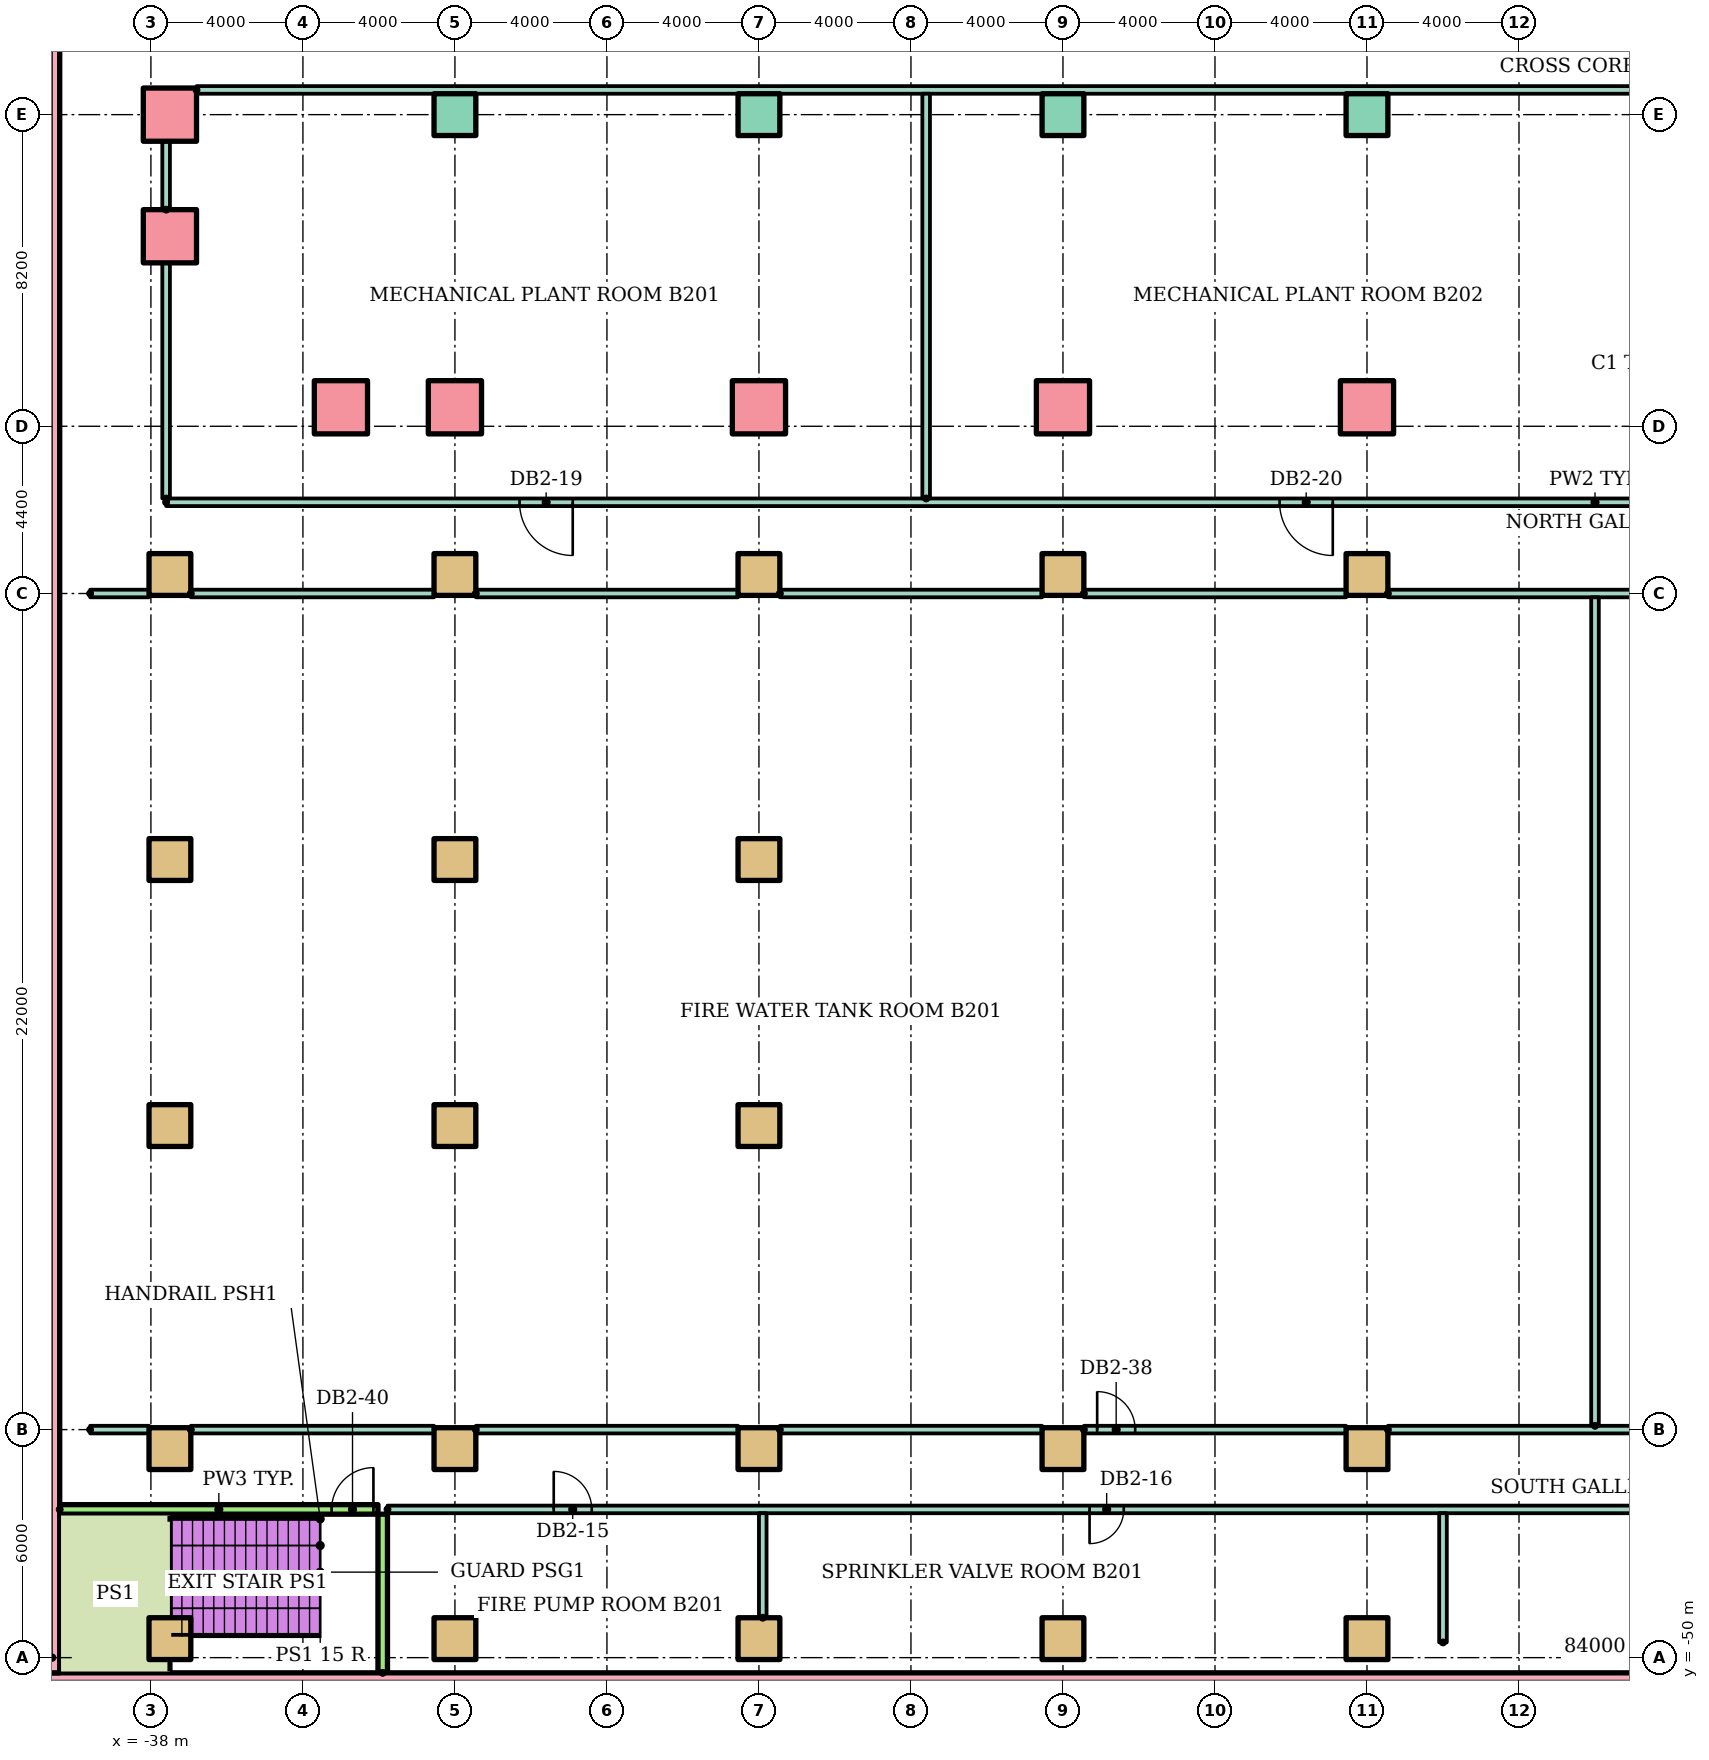
"""IFC4 building model, lengths in metres.
Left out: names, types, materials, properties, quantities, classifications, styles, units other than length and angle.
Written with IfcOpenShell. Run it as: python <this file> out.ifc"""

import sys

from ifc_helpers import new_model, si_unit, direction, frame, frame_2d, origin, origin_2d, place, context, subcontext, project, spatial, rectangle, hollow_rectangle, extrude, element, fill, save


model = new_model("IFC4")
c1 = context("Model", 3, precision=1e-05, world=origin(), true_north=direction((0.0, 1.0)))
c2 = subcontext(c1, "Body", "Model", "MODEL_VIEW")
j1 = project(units=[si_unit("LENGTHUNIT", "METRE"), si_unit("PLANEANGLEUNIT", "RADIAN")], contexts=[c1])
p1 = place(None, origin())
s1 = spatial("IfcSite", under=j1, at=p1, CompositionType="ELEMENT")
p2 = place(p1, origin())
s2 = spatial("IfcBuilding", under=s1, at=p2, CompositionType="ELEMENT")
p3 = place(p2, frame((0.0, 0.0, -10.0)))
s3 = spatial("IfcBuildingStorey", under=s2, at=p3, CompositionType="ELEMENT", Elevation=-10.0)
p4 = place(p3, frame((-41.0, -50.7, -0.3)))
e1 = element("IfcWall", 1, at=p4, inside=s3, PredefinedType="SOLIDWALL", context=c2, shape_type="SweptSolid", body=[
    extrude(rectangle(XDim=82.0, YDim=0.6, at=frame_2d((41.0, 0.0))), origin(), (0.0, 0.0, 1.0), 4.95),
])
p5 = place(p3, frame((-40.7, -50.4, -0.3), z_axis=(0.0, 0.0, 1.0), x_axis=(0.0, 1.0, 0.0)))
e2 = element("IfcWall", 2, at=p5, inside=s3, PredefinedType="SOLIDWALL", context=c2, shape_type="SweptSolid", body=[
    extrude(rectangle(XDim=70.8, YDim=0.6, at=frame_2d((35.4, 0.0))), origin(), (0.0, 0.0, 1.0), 4.95),
])
for number, where in (
    (3, (-33.0, -17.1, -0.3)),
    (4, (-30.0, -17.1, -0.3)),
    (5, (-22.0, -17.1, -0.3)),
    (6, (-14.0, -17.1, -0.3)),
    (7, (-6.0, -17.1, -0.3)),
    (8, (-37.5, -12.6, -0.3)),
    (9, (-37.5, -9.4, -0.3)),
):
    element("IfcColumn", number, at=place(p3, frame(where)), inside=s3, PredefinedType="COLUMN", context=c2, shape_type="SweptSolid", body=[
        extrude(hollow_rectangle(XDim=1.4, YDim=1.4, WallThickness=0.08, at=origin_2d()), origin(), (0.0, 0.0, 1.0), 5.3),
    ])
for number, where in (
    (10, (-30.0, -9.4, -0.3)),
    (11, (-22.0, -9.4, -0.3)),
    (12, (-14.0, -9.4, -0.3)),
    (13, (-6.0, -9.4, -0.3)),
    (14, (-37.5, -49.5, -0.3)),
    (15, (-30.0, -49.5, -0.3)),
    (16, (-22.0, -49.5, -0.3)),
    (17, (-14.0, -49.5, -0.3)),
    (18, (-6.0, -49.5, -0.3)),
    (19, (-37.5, -44.5, -0.3)),
    (20, (-30.0, -44.5, -0.3)),
    (21, (-22.0, -44.5, -0.3)),
    (22, (-14.0, -44.5, -0.3)),
    (23, (-6.0, -44.5, -0.3)),
    (24, (-37.5, -36.0, -0.3)),
    (25, (-30.0, -36.0, -0.3)),
    (26, (-22.0, -36.0, -0.3)),
    (27, (-37.5, -29.0, -0.3)),
    (28, (-30.0, -29.0, -0.3)),
    (29, (-22.0, -29.0, -0.3)),
    (30, (-37.5, -21.5, -0.3)),
    (31, (-30.0, -21.5, -0.3)),
    (32, (-22.0, -21.5, -0.3)),
    (33, (-14.0, -21.5, -0.3)),
    (34, (-6.0, -21.5, -0.3)),
):
    element("IfcColumn", number, at=place(p3, frame(where)), inside=s3, PredefinedType="COLUMN", context=c2, shape_type="SweptSolid", body=[
        extrude(rectangle(XDim=1.1, YDim=1.1, at=origin_2d()), origin(), (0.0, 0.0, 1.0), 5.3),
    ])
p6 = place(p3, frame((-31.775, -46.1, 0.0)))
e35 = element("IfcWall", 35, at=p6, inside=s3, PredefinedType="PARTITIONING", context=c2, shape_type="SweptSolid", body=[
    extrude(rectangle(XDim=63.55, YDim=0.2, at=frame_2d((31.775, 0.0))), origin(), (0.0, 0.0, 1.0), 4.65),
])
p7 = place(p6, frame((4.375, 0.0, 0.0)))
e36 = element("IfcOpeningElement", 36, at=p7, cuts=e35, PredefinedType="OPENING", context=c2, shape_type="SweptSolid", body=[
    extrude(rectangle(XDim=1.0, YDim=2.1, at=frame_2d((0.5, 1.05))), frame((0.0, 0.11, 0.0), z_axis=(0.0, -1.0, 0.0), x_axis=(1.0, 0.0, 0.0)), (0.0, 0.0, 1.0), 0.22),
])
p8 = place(p6, frame((18.475, 0.0, 0.0)))
e37 = element("IfcOpeningElement", 37, at=p8, cuts=e35, PredefinedType="OPENING", context=c2, shape_type="SweptSolid", body=[
    extrude(rectangle(XDim=0.9, YDim=2.1, at=frame_2d((0.45, 1.05))), frame((0.0, 0.11, 0.0), z_axis=(0.0, -1.0, 0.0), x_axis=(1.0, 0.0, 0.0)), (0.0, 0.0, 1.0), 0.22),
])
p9 = place(p6, frame((40.075, 0.0, 0.0)))
e38 = element("IfcOpeningElement", 38, at=p9, cuts=e35, PredefinedType="OPENING", context=c2, shape_type="SweptSolid", body=[
    extrude(rectangle(XDim=1.0, YDim=2.1, at=frame_2d((0.5, 1.05))), frame((0.0, 0.11, 0.0), z_axis=(0.0, -1.0, 0.0), x_axis=(1.0, 0.0, 0.0)), (0.0, 0.0, 1.0), 0.22),
])
p10 = place(p6, frame((54.475, 0.0, 0.0)))
e39 = element("IfcOpeningElement", 39, at=p10, cuts=e35, PredefinedType="OPENING", context=c2, shape_type="SweptSolid", body=[
    extrude(rectangle(XDim=1.0, YDim=2.1, at=frame_2d((0.5, 1.05))), frame((0.0, 0.11, 0.0), z_axis=(0.0, -1.0, 0.0), x_axis=(1.0, 0.0, 0.0)), (0.0, 0.0, 1.0), 0.22),
])
p11 = place(p3, frame((-40.4, -46.1, 0.0)))
e40 = element("IfcWall", 40, at=p11, inside=s3, PredefinedType="SOLIDWALL", context=c2, shape_type="SweptSolid", body=[
    extrude(rectangle(XDim=8.375, YDim=0.25, at=frame_2d((4.188, 0.0))), origin(), (0.0, 0.0, 1.0), 4.65),
])
p12 = place(p11, frame((7.155, 0.0, 0.0)))
e41 = element("IfcOpeningElement", 41, at=p12, cuts=e40, PredefinedType="OPENING", context=c2, shape_type="SweptSolid", body=[
    extrude(rectangle(XDim=1.1, YDim=2.1, at=frame_2d((0.55, 1.05))), frame((0.0, 0.135, 0.0), z_axis=(0.0, -1.0, 0.0), x_axis=(1.0, 0.0, 0.0)), (0.0, 0.0, 1.0), 0.27),
])
p13 = place(p3, frame((-39.6, -44.0, 0.0)))
e42 = element("IfcWall", 42, at=p13, inside=s3, PredefinedType="PARTITIONING", context=c2, shape_type="SweptSolid", body=[
    extrude(rectangle(XDim=1.55, YDim=0.2, at=frame_2d((0.775, 0.0))), origin(), (0.0, 0.0, 1.0), 4.65),
])
p14 = place(p3, frame((-36.95, -44.0, 0.0)))
e43 = element("IfcWall", 43, at=p14, inside=s3, PredefinedType="PARTITIONING", context=c2, shape_type="SweptSolid", body=[
    extrude(rectangle(XDim=6.4, YDim=0.2, at=frame_2d((3.2, 0.0))), origin(), (0.0, 0.0, 1.0), 4.65),
])
for number, where in (
    (44, (-29.45, -44.0, 0.0)),
    (45, (-21.45, -44.0, 0.0)),
):
    element("IfcWall", number, at=place(p3, frame(where)), inside=s3, PredefinedType="PARTITIONING", context=c2, shape_type="SweptSolid", body=[
        extrude(rectangle(XDim=6.9, YDim=0.2, at=frame_2d((3.45, 0.0))), origin(), (0.0, 0.0, 1.0), 4.65),
    ])
p15 = place(p3, frame((-13.45, -44.0, 0.0)))
e46 = element("IfcWall", 46, at=p15, inside=s3, PredefinedType="PARTITIONING", context=c2, shape_type="SweptSolid", body=[
    extrude(rectangle(XDim=6.9, YDim=0.2, at=frame_2d((3.45, 0.0))), origin(), (0.0, 0.0, 1.0), 4.65),
])
p16 = place(p15, frame((0.35, 0.0, 0.0)))
e47 = element("IfcOpeningElement", 47, at=p16, cuts=e46, PredefinedType="OPENING", context=c2, shape_type="SweptSolid", body=[
    extrude(rectangle(XDim=1.0, YDim=2.1, at=frame_2d((0.5, 1.05))), frame((0.0, 0.11, 0.0), z_axis=(0.0, -1.0, 0.0), x_axis=(1.0, 0.0, 0.0)), (0.0, 0.0, 1.0), 0.22),
])
p17 = place(p3, frame((-5.45, -44.0, 0.0)))
e48 = element("IfcWall", 48, at=p17, inside=s3, PredefinedType="PARTITIONING", context=c2, shape_type="SweptSolid", body=[
    extrude(rectangle(XDim=6.9, YDim=0.2, at=frame_2d((3.45, 0.0))), origin(), (0.0, 0.0, 1.0), 4.65),
])
p18 = place(p3, frame((-39.6, -22.0, 0.0)))
e49 = element("IfcWall", 49, at=p18, inside=s3, PredefinedType="PARTITIONING", context=c2, shape_type="SweptSolid", body=[
    extrude(rectangle(XDim=1.55, YDim=0.2, at=frame_2d((0.775, 0.0))), origin(), (0.0, 0.0, 1.0), 4.65),
])
p19 = place(p3, frame((-36.95, -22.0, 0.0)))
e50 = element("IfcWall", 50, at=p19, inside=s3, PredefinedType="PARTITIONING", context=c2, shape_type="SweptSolid", body=[
    extrude(rectangle(XDim=6.4, YDim=0.2, at=frame_2d((3.2, 0.0))), origin(), (0.0, 0.0, 1.0), 4.65),
])
for number, where in (
    (51, (-29.45, -22.0, 0.0)),
    (52, (-21.45, -22.0, 0.0)),
    (53, (-13.45, -22.0, 0.0)),
    (54, (-5.45, -22.0, 0.0)),
):
    element("IfcWall", number, at=place(p3, frame(where)), inside=s3, PredefinedType="PARTITIONING", context=c2, shape_type="SweptSolid", body=[
        extrude(rectangle(XDim=6.9, YDim=0.2, at=frame_2d((3.45, 0.0))), origin(), (0.0, 0.0, 1.0), 4.65),
    ])
p20 = place(p3, frame((-37.6, -19.6, 0.0)))
e55 = element("IfcWall", 55, at=p20, inside=s3, PredefinedType="PARTITIONING", context=c2, shape_type="SweptSolid", body=[
    extrude(rectangle(XDim=75.2, YDim=0.2, at=frame_2d((37.6, 0.0))), origin(), (0.0, 0.0, 1.0), 4.65),
])
p21 = place(p20, frame((9.3, 0.0, 0.0)))
e56 = element("IfcOpeningElement", 56, at=p21, cuts=e55, PredefinedType="OPENING", context=c2, shape_type="SweptSolid", body=[
    extrude(rectangle(XDim=1.4, YDim=2.1, at=frame_2d((0.7, 1.05))), frame((0.0, 0.11, 0.0), z_axis=(0.0, -1.0, 0.0), x_axis=(1.0, 0.0, 0.0)), (0.0, 0.0, 1.0), 0.22),
])
p22 = place(p20, frame((29.3, 0.0, 0.0)))
e57 = element("IfcOpeningElement", 57, at=p22, cuts=e55, PredefinedType="OPENING", context=c2, shape_type="SweptSolid", body=[
    extrude(rectangle(XDim=1.4, YDim=2.1, at=frame_2d((0.7, 1.05))), frame((0.0, 0.11, 0.0), z_axis=(0.0, -1.0, 0.0), x_axis=(1.0, 0.0, 0.0)), (0.0, 0.0, 1.0), 0.22),
])
p23 = place(p20, frame((46.5, 0.0, 0.0)))
e58 = element("IfcOpeningElement", 58, at=p23, cuts=e55, PredefinedType="OPENING", context=c2, shape_type="SweptSolid", body=[
    extrude(rectangle(XDim=1.0, YDim=2.1, at=frame_2d((0.5, 1.05))), frame((0.0, 0.11, 0.0), z_axis=(0.0, -1.0, 0.0), x_axis=(1.0, 0.0, 0.0)), (0.0, 0.0, 1.0), 0.22),
])
p24 = place(p20, frame((64.15, 0.0, 0.0)))
e59 = element("IfcOpeningElement", 59, at=p24, cuts=e55, PredefinedType="OPENING", context=c2, shape_type="SweptSolid", body=[
    extrude(rectangle(XDim=0.9, YDim=2.1, at=frame_2d((0.45, 1.05))), frame((0.0, 0.11, 0.0), z_axis=(0.0, -1.0, 0.0), x_axis=(1.0, 0.0, 0.0)), (0.0, 0.0, 1.0), 0.22),
])
p25 = place(p3, frame((-36.8, -8.75, 0.0)))
e60 = element("IfcWall", 60, at=p25, inside=s3, PredefinedType="PARTITIONING", context=c2, shape_type="SweptSolid", body=[
    extrude(rectangle(XDim=73.6, YDim=0.2, at=frame_2d((36.8, 0.0))), origin(), (0.0, 0.0, 1.0), 4.65),
])
p26 = place(p3, frame((-37.6, -19.5, 0.0), z_axis=(0.0, 0.0, 1.0), x_axis=(0.0, 1.0, 0.0)))
e61 = element("IfcWall", 61, at=p26, inside=s3, PredefinedType="PARTITIONING", context=c2, shape_type="SweptSolid", body=[
    extrude(rectangle(XDim=6.2, YDim=0.2, at=frame_2d((3.1, 0.0))), origin(), (0.0, 0.0, 1.0), 4.65),
])
p27 = place(p3, frame((-37.6, -11.9, 0.0), z_axis=(0.0, 0.0, 1.0), x_axis=(0.0, 1.0, 0.0)))
e62 = element("IfcWall", 62, at=p27, inside=s3, PredefinedType="PARTITIONING", context=c2, shape_type="SweptSolid", body=[
    extrude(rectangle(XDim=1.8, YDim=0.2, at=frame_2d((0.9, 0.0))), origin(), (0.0, 0.0, 1.0), 4.65),
])
p28 = place(p3, frame((-31.9, -50.4, 0.0), z_axis=(0.0, 0.0, 1.0), x_axis=(0.0, 1.0, 0.0)))
e63 = element("IfcWall", 63, at=p28, inside=s3, PredefinedType="SOLIDWALL", context=c2, shape_type="SweptSolid", body=[
    extrude(rectangle(XDim=4.175, YDim=0.25, at=frame_2d((2.087, 0.0))), origin(), (0.0, 0.0, 1.0), 4.65),
])
p29 = place(p3, frame((-21.9, -48.95, 0.0), z_axis=(0.0, 0.0, 1.0), x_axis=(0.0, 1.0, 0.0)))
e64 = element("IfcWall", 64, at=p29, inside=s3, PredefinedType="PARTITIONING", context=c2, shape_type="SweptSolid", body=[
    extrude(rectangle(XDim=2.75, YDim=0.2, at=frame_2d((1.375, 0.0))), origin(), (0.0, 0.0, 1.0), 4.65),
])
p30 = place(p3, frame((-17.6, -19.5, 0.0), z_axis=(0.0, 0.0, 1.0), x_axis=(0.0, 1.0, 0.0)))
e65 = element("IfcWall", 65, at=p30, inside=s3, PredefinedType="PARTITIONING", context=c2, shape_type="SweptSolid", body=[
    extrude(rectangle(XDim=10.65, YDim=0.2, at=frame_2d((5.325, 0.0))), origin(), (0.0, 0.0, 1.0), 4.65),
])
p31 = place(p3, frame((-4.0, -49.6, 0.0), z_axis=(0.0, 0.0, 1.0), x_axis=(0.0, 1.0, 0.0)))
e66 = element("IfcWall", 66, at=p31, inside=s3, PredefinedType="PARTITIONING", context=c2, shape_type="SweptSolid", body=[
    extrude(rectangle(XDim=3.4, YDim=0.2, at=frame_2d((1.7, 0.0))), origin(), (0.0, 0.0, 1.0), 4.65),
])
p32 = place(p3, frame((0.0, -43.9, 0.0), z_axis=(0.0, 0.0, 1.0), x_axis=(0.0, 1.0, 0.0)))
e67 = element("IfcWall", 67, at=p32, inside=s3, PredefinedType="PARTITIONING", context=c2, shape_type="SweptSolid", body=[
    extrude(rectangle(XDim=21.8, YDim=0.2, at=frame_2d((10.9, 0.0))), origin(), (0.0, 0.0, 1.0), 4.65),
])
p33 = place(p7, origin())
e68 = element("IfcDoor", 68, at=p33, inside=s3, OperationType="SINGLE_SWING_LEFT", PredefinedType="DOOR", context=c2, shape_type="SweptSolid", body=[
    extrude(rectangle(XDim=1.0, YDim=2.1, at=frame_2d((0.5, 1.05))), frame((0.0, 0.025, 0.0), z_axis=(0.0, -1.0, 0.0), x_axis=(1.0, 0.0, 0.0)), (0.0, 0.0, 1.0), 0.05),
])
fill(e36, e68)
p34 = place(p8, frame((0.9, 0.0, 0.0), z_axis=(0.0, 0.0, 1.0), x_axis=(-1.0, 0.0, 0.0)))
e69 = element("IfcDoor", 69, at=p34, inside=s3, OperationType="SINGLE_SWING_LEFT", PredefinedType="DOOR", context=c2, shape_type="SweptSolid", body=[
    extrude(rectangle(XDim=0.9, YDim=2.1, at=frame_2d((0.45, 1.05))), frame((0.0, 0.025, 0.0), z_axis=(0.0, -1.0, 0.0), x_axis=(1.0, 0.0, 0.0)), (0.0, 0.0, 1.0), 0.05),
])
fill(e37, e69)
p35 = place(p21, frame((1.4, 0.0, 0.0), z_axis=(0.0, 0.0, 1.0), x_axis=(-1.0, 0.0, 0.0)))
e70 = element("IfcDoor", 70, at=p35, inside=s3, OperationType="DOUBLE_DOOR_SINGLE_SWING", PredefinedType="DOOR", context=c2, shape_type="SweptSolid", body=[
    extrude(rectangle(XDim=1.4, YDim=2.1, at=frame_2d((0.7, 1.05))), frame((0.0, 0.025, 0.0), z_axis=(0.0, -1.0, 0.0), x_axis=(1.0, 0.0, 0.0)), (0.0, 0.0, 1.0), 0.05),
])
fill(e56, e70)
p36 = place(p22, frame((1.4, 0.0, 0.0), z_axis=(0.0, 0.0, 1.0), x_axis=(-1.0, 0.0, 0.0)))
e71 = element("IfcDoor", 71, at=p36, inside=s3, OperationType="DOUBLE_DOOR_SINGLE_SWING", PredefinedType="DOOR", context=c2, shape_type="SweptSolid", body=[
    extrude(rectangle(XDim=1.4, YDim=2.1, at=frame_2d((0.7, 1.05))), frame((0.0, 0.025, 0.0), z_axis=(0.0, -1.0, 0.0), x_axis=(1.0, 0.0, 0.0)), (0.0, 0.0, 1.0), 0.05),
])
fill(e57, e71)
p37 = place(p16, origin())
e72 = element("IfcDoor", 72, at=p37, inside=s3, OperationType="SINGLE_SWING_LEFT", PredefinedType="DOOR", context=c2, shape_type="SweptSolid", body=[
    extrude(rectangle(XDim=1.0, YDim=2.1, at=frame_2d((0.5, 1.05))), frame((0.0, 0.025, 0.0), z_axis=(0.0, -1.0, 0.0), x_axis=(1.0, 0.0, 0.0)), (0.0, 0.0, 1.0), 0.05),
])
fill(e47, e72)
p38 = place(p12, origin())
e73 = element("IfcDoor", 73, at=p38, inside=s3, OperationType="SINGLE_SWING_RIGHT", PredefinedType="DOOR", context=c2, shape_type="SweptSolid", body=[
    extrude(rectangle(XDim=1.1, YDim=2.1, at=frame_2d((0.55, 1.05))), frame((0.0, 0.025, 0.0), z_axis=(0.0, -1.0, 0.0), x_axis=(1.0, 0.0, 0.0)), (0.0, 0.0, 1.0), 0.05),
])
fill(e41, e73)
save(model, sys.argv[1])
